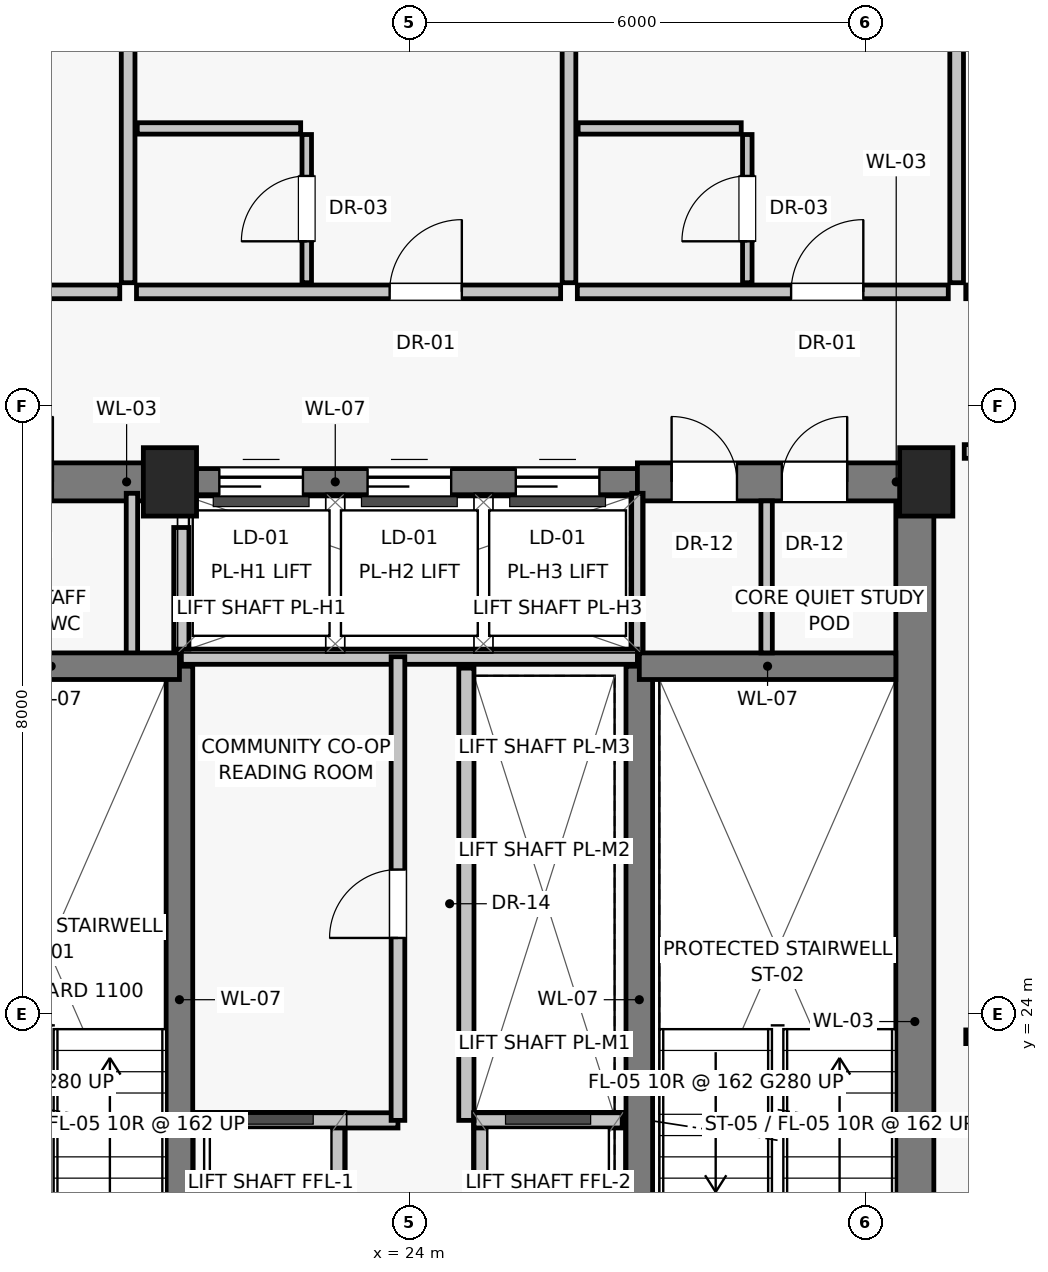
"""IFC4 building model, lengths in metres.
Left out: names, types, materials, properties, quantities, classifications, styles, units other than length and angle.
Written with IfcOpenShell. Run it as: python <this file> out.ifc"""

import sys

from ifc_helpers import new_model, si_unit, direction, frame, frame_2d, origin, origin_2d, place, context, subcontext, project, spatial, rectangle, extrude, source, transform, mapped, element, fill, save


model = new_model("IFC4")
c1 = context("Model", 3, precision=1e-05, world=origin(), true_north=direction((0.0, 1.0)))
c2 = subcontext(c1, "Body", "Model", "MODEL_VIEW")
j1 = project(units=[si_unit("LENGTHUNIT", "METRE"), si_unit("PLANEANGLEUNIT", "RADIAN")], contexts=[c1])
p1 = place(None, origin())
s1 = spatial("IfcSite", under=j1, at=p1, CompositionType="ELEMENT")
p2 = place(p1, origin())
s2 = spatial("IfcBuilding", under=s1, at=p2, CompositionType="ELEMENT")
p3 = place(p2, frame((0.0, 0.0, 182.1)))
s3 = spatial("IfcBuildingStorey", under=s2, at=p3, CompositionType="ELEMENT", Elevation=182.1)
for number, where, z_axis, x_axis in (
    (1, (20.85, 31.0, 0.0), (0.0, 0.0, 1.0), (1.0, 0.0, 0.0)),
    (2, (30.8, 31.0, 0.0), (0.0, 0.0, 1.0), (1.0, 0.0, 0.0)),
):
    element("IfcColumn", number, at=place(p3, frame(where, z_axis=z_axis, x_axis=x_axis)), inside=s3, PredefinedType="PILASTER", context=c2, shape_type="SweptSolid", body=[
        extrude(rectangle(XDim=0.7, YDim=0.9, at=origin_2d()), origin(), (0.0, 0.0, 1.0), 3.25),
    ])
p4 = place(p3, frame((30.65, 16.8, 0.0), z_axis=(0.0, 0.0, 1.0), x_axis=(0.0, 1.0, 0.0)))
e3 = element("IfcWall", 3, at=p4, inside=s3, PredefinedType="SHEAR", context=c2, shape_type="SweptSolid", body=[
    extrude(rectangle(XDim=14.2, YDim=0.5, at=frame_2d((7.1, 0.0))), origin(), (0.0, 0.0, 1.0), 3.015),
])
p5 = place(p3, frame((17.2, 31.0, 0.0), z_axis=(0.0, 0.0, 1.0), x_axis=(1.0, 0.0, 0.0)))
e4 = element("IfcWall", 4, at=p5, inside=s3, PredefinedType="SHEAR", context=c2, shape_type="SweptSolid", body=[
    extrude(rectangle(XDim=3.8, YDim=0.5, at=frame_2d((1.9, 0.0))), origin(), (0.0, 0.0, 1.0), 3.015),
])
p6 = place(p5, frame((1.25, 0.0, 0.0)))
e5 = element("IfcOpeningElement", 5, at=p6, cuts=e4, PredefinedType="OPENING", context=c2, shape_type="SweptSolid", body=[
    extrude(rectangle(XDim=0.86, YDim=2.01, at=frame_2d((0.43, 1.005))), frame((0.0, 0.26, 0.0), z_axis=(0.0, -1.0, 0.0), x_axis=(1.0, 0.0, 0.0)), (0.0, 0.0, 1.0), 0.52),
])
p7 = place(p3, frame((21.0, 31.0, 0.0), z_axis=(0.0, 0.0, 1.0), x_axis=(1.0, 0.0, 0.0)))
e6 = element("IfcWall", 6, at=p7, inside=s3, PredefinedType="SHEAR", context=c2, shape_type="SweptSolid", body=[
    extrude(rectangle(XDim=6.0, YDim=0.35, at=frame_2d((3.0, 0.0))), origin(), (0.0, 0.0, 1.0), 3.015),
])
p8 = place(p7, frame((0.5, 0.0, 0.0)))
e7 = element("IfcOpeningElement", 7, at=p8, cuts=e6, PredefinedType="OPENING", context=c2, shape_type="SweptSolid", body=[
    extrude(rectangle(XDim=1.1, YDim=2.08, at=frame_2d((0.55, 1.04))), frame((0.0, 0.185, 0.0), z_axis=(0.0, -1.0, 0.0), x_axis=(1.0, 0.0, 0.0)), (0.0, 0.0, 1.0), 0.37),
])
p9 = place(p7, frame((2.45, 0.0, 0.0)))
e8 = element("IfcOpeningElement", 8, at=p9, cuts=e6, PredefinedType="OPENING", context=c2, shape_type="SweptSolid", body=[
    extrude(rectangle(XDim=1.1, YDim=2.08, at=frame_2d((0.55, 1.04))), frame((0.0, 0.185, 0.0), z_axis=(0.0, -1.0, 0.0), x_axis=(1.0, 0.0, 0.0)), (0.0, 0.0, 1.0), 0.37),
])
p10 = place(p7, frame((4.4, 0.0, 0.0)))
e9 = element("IfcOpeningElement", 9, at=p10, cuts=e6, PredefinedType="OPENING", context=c2, shape_type="SweptSolid", body=[
    extrude(rectangle(XDim=1.1, YDim=2.08, at=frame_2d((0.55, 1.04))), frame((0.0, 0.185, 0.0), z_axis=(0.0, -1.0, 0.0), x_axis=(1.0, 0.0, 0.0)), (0.0, 0.0, 1.0), 0.37),
])
p11 = place(p3, frame((27.0, 31.0, 0.0), z_axis=(0.0, 0.0, 1.0), x_axis=(1.0, 0.0, 0.0)))
e10 = element("IfcWall", 10, at=p11, inside=s3, PredefinedType="SHEAR", context=c2, shape_type="SweptSolid", body=[
    extrude(rectangle(XDim=3.8, YDim=0.5, at=frame_2d((1.9, 0.0))), origin(), (0.0, 0.0, 1.0), 3.015),
])
p12 = place(p11, frame((0.45, 0.0, 0.0)))
e11 = element("IfcOpeningElement", 11, at=p12, cuts=e10, PredefinedType="OPENING", context=c2, shape_type="SweptSolid", body=[
    extrude(rectangle(XDim=0.86, YDim=2.01, at=frame_2d((0.43, 1.005))), frame((0.0, 0.26, 0.0), z_axis=(0.0, -1.0, 0.0), x_axis=(1.0, 0.0, 0.0)), (0.0, 0.0, 1.0), 0.52),
])
p13 = place(p11, frame((1.9, 0.0, 0.0)))
e12 = element("IfcOpeningElement", 12, at=p13, cuts=e10, PredefinedType="OPENING", context=c2, shape_type="SweptSolid", body=[
    extrude(rectangle(XDim=0.86, YDim=2.01, at=frame_2d((0.43, 1.005))), frame((0.0, 0.26, 0.0), z_axis=(0.0, -1.0, 0.0), x_axis=(1.0, 0.0, 0.0)), (0.0, 0.0, 1.0), 0.52),
])
for number, where, z_axis, x_axis in (
    (13, (20.35, 28.65, 0.0), (0.0, 0.0, 1.0), (0.0, 1.0, 0.0)),
    (14, (27.0, 28.65, 0.0), (0.0, 0.0, 1.0), (0.0, 1.0, 0.0)),
):
    element("IfcWall", number, at=place(p3, frame(where, z_axis=z_axis, x_axis=x_axis)), inside=s3, PredefinedType="PARTITIONING", context=c2, shape_type="SweptSolid", body=[
        extrude(rectangle(XDim=2.2, YDim=0.15, at=frame_2d((1.1, 0.0))), origin(), (0.0, 0.0, 1.0), 3.015),
    ])
for number, where, z_axis, x_axis in (
    (15, (20.975, 19.8, 0.0), (0.0, 0.0, 1.0), (0.0, 1.0, 0.0)),
    (16, (27.025, 19.8, 0.0), (0.0, 0.0, 1.0), (0.0, 1.0, 0.0)),
):
    element("IfcWall", number, at=place(p3, frame(where, z_axis=z_axis, x_axis=x_axis)), inside=s3, PredefinedType="SHEAR", context=c2, shape_type="SweptSolid", body=[
        extrude(rectangle(XDim=8.775, YDim=0.35, at=frame_2d((4.387, 0.0))), origin(), (0.0, 0.0, 1.0), 3.015),
    ])
for number, where, z_axis, x_axis in (
    (17, (17.6, 28.575, 0.0), (0.0, 0.0, 1.0), (1.0, 0.0, 0.0)),
    (18, (27.025, 28.575, 0.0), (0.0, 0.0, 1.0), (1.0, 0.0, 0.0)),
):
    element("IfcWall", number, at=place(p3, frame(where, z_axis=z_axis, x_axis=x_axis)), inside=s3, PredefinedType="SHEAR", context=c2, shape_type="SweptSolid", body=[
        extrude(rectangle(XDim=3.375, YDim=0.35, at=frame_2d((1.688, 0.0))), origin(), (0.0, 0.0, 1.0), 3.015),
    ])
for number, where, z_axis, x_axis in (
    (19, (23.05, 16.95, 0.0), (0.0, 0.0, 1.0), (0.0, 1.0, 0.0)),
    (20, (24.95, 16.95, 0.0), (0.0, 0.0, 1.0), (0.0, 1.0, 0.0)),
):
    element("IfcWall", number, at=place(p3, frame(where, z_axis=z_axis, x_axis=x_axis)), inside=s3, PredefinedType="SOLIDWALL", context=c2, shape_type="SweptSolid", body=[
        extrude(rectangle(XDim=5.6, YDim=0.2, at=frame_2d((2.8, 0.0))), origin(), (0.0, 0.0, 1.0), 3.015),
    ])
p14 = place(p3, frame((21.2, 22.6, 0.0), z_axis=(0.0, 0.0, 1.0), x_axis=(1.0, 0.0, 0.0)))
e21 = element("IfcWall", 21, at=p14, inside=s3, PredefinedType="SOLIDWALL", context=c2, shape_type="SweptSolid", body=[
    extrude(rectangle(XDim=2.65, YDim=0.2, at=frame_2d((1.325, 0.0))), origin(), (0.0, 0.0, 1.0), 3.015),
])
p15 = place(p3, frame((24.85, 22.6, 0.0), z_axis=(0.0, 0.0, 1.0), x_axis=(1.0, 0.0, 0.0)))
e22 = element("IfcWall", 22, at=p15, inside=s3, PredefinedType="SOLIDWALL", context=c2, shape_type="SweptSolid", body=[
    extrude(rectangle(XDim=1.95, YDim=0.2, at=frame_2d((0.975, 0.0))), origin(), (0.0, 0.0, 1.0), 3.015),
])
p16 = place(p3, frame((21.0, 28.7, 0.0), z_axis=(0.0, 0.0, 1.0), x_axis=(1.0, 0.0, 0.0)))
e23 = element("IfcWall", 23, at=p16, inside=s3, PredefinedType="SOLIDWALL", context=c2, shape_type="SweptSolid", body=[
    extrude(rectangle(XDim=6.0, YDim=0.2, at=frame_2d((3.0, 0.0))), origin(), (0.0, 0.0, 1.0), 3.015),
])
p17 = place(p3, frame((21.0, 28.8, 0.0), z_axis=(0.0, 0.0, 1.0), x_axis=(0.0, 1.0, 0.0)))
e24 = element("IfcWall", 24, at=p17, inside=s3, PredefinedType="SOLIDWALL", context=c2, shape_type="SweptSolid", body=[
    extrude(rectangle(XDim=1.6, YDim=0.2, at=frame_2d((0.8, 0.0))), origin(), (0.0, 0.0, 1.0), 3.015),
])
p18 = place(p3, frame((23.85, 22.6, 0.0), z_axis=(0.0, 0.0, 1.0), x_axis=(0.0, 1.0, 0.0)))
e25 = element("IfcWall", 25, at=p18, inside=s3, PredefinedType="PARTITIONING", context=c2, shape_type="SweptSolid", body=[
    extrude(rectangle(XDim=6.1, YDim=0.18, at=frame_2d((3.05, 0.0))), origin(), (0.0, 0.0, 1.0), 3.015),
])
p19 = place(p18, frame((2.4, 0.0, 0.0)))
e26 = element("IfcOpeningElement", 26, at=p19, cuts=e25, PredefinedType="OPENING", context=c2, shape_type="SweptSolid", body=[
    extrude(rectangle(XDim=0.9, YDim=2.01, at=frame_2d((0.45, 1.005))), frame((0.0, 0.1, 0.0), z_axis=(0.0, -1.0, 0.0), x_axis=(1.0, 0.0, 0.0)), (0.0, 0.0, 1.0), 0.2),
])
p20 = place(p3, frame((24.75, 22.6, 0.0), z_axis=(0.0, 0.0, 1.0), x_axis=(0.0, 1.0, 0.0)))
e27 = element("IfcWall", 27, at=p20, inside=s3, PredefinedType="SOLIDWALL", context=c2, shape_type="SweptSolid", body=[
    extrude(rectangle(XDim=5.95, YDim=0.2, at=frame_2d((2.975, 0.0))), origin(), (0.0, 0.0, 1.0), 3.015),
])
p21 = place(p3, frame((28.7, 28.75, 0.0), z_axis=(0.0, 0.0, 1.0), x_axis=(0.0, 1.0, 0.0)))
e28 = element("IfcWall", 28, at=p21, inside=s3, PredefinedType="PARTITIONING", context=c2, shape_type="SweptSolid", body=[
    extrude(rectangle(XDim=2.0, YDim=0.15, at=frame_2d((1.0, 0.0))), origin(), (0.0, 0.0, 1.0), 3.015),
])
p22 = place(p3, frame((31.2, 33.62, 0.0), z_axis=(0.0, 0.0, 1.0), x_axis=(0.0, 1.0, 0.0)))
e29 = element("IfcWall", 29, at=p22, inside=s3, PredefinedType="PARTITIONING", context=c2, shape_type="SweptSolid", body=[
    extrude(rectangle(XDim=6.597, YDim=0.18, at=frame_2d((3.299, 0.0))), origin(), (0.0, 0.0, 1.0), 3.015),
])
p23 = place(p3, frame((15.31, 33.5, 0.0), z_axis=(0.0, 0.0, 1.0), x_axis=(1.0, 0.0, 0.0)))
e30 = element("IfcWall", 30, at=p23, inside=s3, PredefinedType="PARTITIONING", context=c2, shape_type="SweptSolid", body=[
    extrude(rectangle(XDim=4.88, YDim=0.18, at=frame_2d((2.44, 0.0))), origin(), (0.0, 0.0, 1.0), 3.015),
])
p24 = place(p23, frame((2.812, 0.0, 0.0)))
e31 = element("IfcOpeningElement", 31, at=p24, cuts=e30, PredefinedType="OPENING", context=c2, shape_type="SweptSolid", body=[
    extrude(rectangle(XDim=0.95, YDim=2.02, at=frame_2d((0.475, 1.01))), frame((0.0, 0.1, 0.0), z_axis=(0.0, -1.0, 0.0), x_axis=(1.0, 0.0, 0.0)), (0.0, 0.0, 1.0), 0.2),
])
p25 = place(p3, frame((20.3, 33.62, 0.0), z_axis=(0.0, 0.0, 1.0), x_axis=(0.0, 1.0, 0.0)))
e32 = element("IfcWall", 32, at=p25, inside=s3, PredefinedType="PARTITIONING", context=c2, shape_type="SweptSolid", body=[
    extrude(rectangle(XDim=9.439, YDim=0.18, at=frame_2d((4.719, 0.0))), origin(), (0.0, 0.0, 1.0), 2.469),
])
p26 = place(p3, frame((20.41, 33.5, 0.0), z_axis=(0.0, 0.0, 1.0), x_axis=(1.0, 0.0, 0.0)))
e33 = element("IfcWall", 33, at=p26, inside=s3, PredefinedType="PARTITIONING", context=c2, shape_type="SweptSolid", body=[
    extrude(rectangle(XDim=5.58, YDim=0.18, at=frame_2d((2.79, 0.0))), origin(), (0.0, 0.0, 1.0), 3.015),
])
p27 = place(p26, frame((3.33, 0.0, 0.0)))
e34 = element("IfcOpeningElement", 34, at=p27, cuts=e33, PredefinedType="OPENING", context=c2, shape_type="SweptSolid", body=[
    extrude(rectangle(XDim=0.95, YDim=2.02, at=frame_2d((0.475, 1.01))), frame((0.0, 0.1, 0.0), z_axis=(0.0, -1.0, 0.0), x_axis=(1.0, 0.0, 0.0)), (0.0, 0.0, 1.0), 0.2),
])
p28 = place(p3, frame((22.65, 33.62, 0.0), z_axis=(0.0, 0.0, 1.0), x_axis=(0.0, 1.0, 0.0)))
e35 = element("IfcWall", 35, at=p28, inside=s3, PredefinedType="PARTITIONING", context=c2, shape_type="SweptSolid", body=[
    extrude(rectangle(XDim=1.95, YDim=0.125, at=frame_2d((0.975, 0.0))), origin(), (0.0, 0.0, 1.0), 3.015),
])
p29 = place(p28, frame((0.545, 0.0, 0.0)))
e36 = element("IfcOpeningElement", 36, at=p29, cuts=e35, PredefinedType="OPENING", context=c2, shape_type="SweptSolid", body=[
    extrude(rectangle(XDim=0.86, YDim=2.01, at=frame_2d((0.43, 1.005))), frame((0.0, 0.073, 0.0), z_axis=(0.0, -1.0, 0.0), x_axis=(1.0, 0.0, 0.0)), (0.0, 0.0, 1.0), 0.145),
])
p30 = place(p3, frame((20.42, 35.65, 0.0), z_axis=(0.0, 0.0, 1.0), x_axis=(1.0, 0.0, 0.0)))
e37 = element("IfcWall", 37, at=p30, inside=s3, PredefinedType="PARTITIONING", context=c2, shape_type="SweptSolid", body=[
    extrude(rectangle(XDim=2.15, YDim=0.15, at=frame_2d((1.075, 0.0))), origin(), (0.0, 0.0, 1.0), 2.662),
])
p31 = place(p3, frame((26.1, 33.62, 0.0), z_axis=(0.0, 0.0, 1.0), x_axis=(0.0, 1.0, 0.0)))
e38 = element("IfcWall", 38, at=p31, inside=s3, PredefinedType="PARTITIONING", context=c2, shape_type="SweptSolid", body=[
    extrude(rectangle(XDim=8.737, YDim=0.18, at=frame_2d((4.369, 0.0))), origin(), (0.0, 0.0, 1.0), 3.015),
])
p32 = place(p3, frame((26.21, 33.5, 0.0), z_axis=(0.0, 0.0, 1.0), x_axis=(1.0, 0.0, 0.0)))
e39 = element("IfcWall", 39, at=p32, inside=s3, PredefinedType="PARTITIONING", context=c2, shape_type="SweptSolid", body=[
    extrude(rectangle(XDim=4.88, YDim=0.18, at=frame_2d((2.44, 0.0))), origin(), (0.0, 0.0, 1.0), 3.015),
])
p33 = place(p32, frame((2.812, 0.0, 0.0)))
e40 = element("IfcOpeningElement", 40, at=p33, cuts=e39, PredefinedType="OPENING", context=c2, shape_type="SweptSolid", body=[
    extrude(rectangle(XDim=0.95, YDim=2.02, at=frame_2d((0.475, 1.01))), frame((0.0, 0.1, 0.0), z_axis=(0.0, -1.0, 0.0), x_axis=(1.0, 0.0, 0.0)), (0.0, 0.0, 1.0), 0.2),
])
p34 = place(p3, frame((28.446, 33.62, 0.0), z_axis=(0.0, 0.0, 1.0), x_axis=(0.0, 1.0, 0.0)))
e41 = element("IfcWall", 41, at=p34, inside=s3, PredefinedType="PARTITIONING", context=c2, shape_type="SweptSolid", body=[
    extrude(rectangle(XDim=1.95, YDim=0.125, at=frame_2d((0.975, 0.0))), origin(), (0.0, 0.0, 1.0), 3.015),
])
p35 = place(p34, frame((0.545, 0.0, 0.0)))
e42 = element("IfcOpeningElement", 42, at=p35, cuts=e41, PredefinedType="OPENING", context=c2, shape_type="SweptSolid", body=[
    extrude(rectangle(XDim=0.86, YDim=2.01, at=frame_2d((0.43, 1.005))), frame((0.0, 0.073, 0.0), z_axis=(0.0, -1.0, 0.0), x_axis=(1.0, 0.0, 0.0)), (0.0, 0.0, 1.0), 0.145),
])
p36 = place(p3, frame((26.22, 35.65, 0.0), z_axis=(0.0, 0.0, 1.0), x_axis=(1.0, 0.0, 0.0)))
e43 = element("IfcWall", 43, at=p36, inside=s3, PredefinedType="PARTITIONING", context=c2, shape_type="SweptSolid", body=[
    extrude(rectangle(XDim=2.146, YDim=0.15, at=frame_2d((1.073, 0.0))), origin(), (0.0, 0.0, 1.0), 2.662),
])
p37 = place(p3, frame((31.32, 23.7, 0.0), z_axis=(0.0, 0.0, 1.0), x_axis=(1.0, 0.0, 0.0)))
e44 = element("IfcWall", 44, at=p37, inside=s3, PredefinedType="PARTITIONING", context=c2, shape_type="SweptSolid", body=[
    extrude(rectangle(XDim=10.601, YDim=0.18, at=frame_2d((5.3, 0.0))), origin(), (0.0, 0.0, 1.0), 3.015),
])
p38 = place(p3, frame((31.3, 31.4, 0.0), z_axis=(0.0, 0.0, 1.0), x_axis=(1.0, 0.0, 0.0)))
e45 = element("IfcWall", 45, at=p38, inside=s3, PredefinedType="PARTITIONING", context=c2, shape_type="SweptSolid", body=[
    extrude(rectangle(XDim=1.92, YDim=0.18, at=frame_2d((0.96, 0.0))), origin(), (0.0, 0.0, 1.0), 3.015),
])
p39 = place(p38, frame((0.72, 0.0, 0.0)))
e46 = element("IfcOpeningElement", 46, at=p39, cuts=e45, PredefinedType="OPENING", context=c2, shape_type="SweptSolid", body=[
    extrude(rectangle(XDim=1.0, YDim=2.01, at=frame_2d((0.5, 1.005))), frame((0.0, 0.1, 0.0), z_axis=(0.0, -1.0, 0.0), x_axis=(1.0, 0.0, 0.0)), (0.0, 0.0, 1.0), 0.2),
])
p40 = place(p3, frame((31.32, 33.5, 0.0), z_axis=(0.0, 0.0, 1.0), x_axis=(1.0, 0.0, 0.0)))
e47 = element("IfcWall", 47, at=p40, inside=s3, PredefinedType="PARTITIONING", context=c2, shape_type="SweptSolid", body=[
    extrude(rectangle(XDim=1.86, YDim=0.18, at=frame_2d((0.93, 0.0))), origin(), (0.0, 0.0, 1.0), 3.015),
])
p41 = place(p40, frame((0.48, 0.0, 0.0)))
e48 = element("IfcOpeningElement", 48, at=p41, cuts=e47, PredefinedType="OPENING", context=c2, shape_type="SweptSolid", body=[
    extrude(rectangle(XDim=0.9, YDim=2.01, at=frame_2d((0.45, 1.005))), frame((0.0, 0.1, 0.0), z_axis=(0.0, -1.0, 0.0), x_axis=(1.0, 0.0, 0.0)), (0.0, 0.0, 1.0), 0.2),
])
m1 = source(origin(), c2, "Body", "SweptSolid", [
    extrude(rectangle(XDim=0.86, YDim=2.01, at=frame_2d((0.43, 1.005))), frame((0.0, 0.025, 0.0), z_axis=(0.0, -1.0, 0.0), x_axis=(1.0, 0.0, 0.0)), (0.0, 0.0, 1.0), 0.05),
])
p42 = place(p6, origin())
e49 = element("IfcDoor", 49, at=p42, inside=s3, OperationType="SINGLE_SWING_RIGHT", PredefinedType="DOOR", context=c2, shape_type="MappedRepresentation", body=[
    mapped(m1, transform((0.0, 0.0, 0.0), scale=1.0)),
])
fill(e5, e49)
m2 = source(origin(), c2, "Body", "SweptSolid", [
    extrude(rectangle(XDim=1.1, YDim=2.08, at=frame_2d((0.55, 1.04))), frame((0.0, 0.025, 0.0), z_axis=(0.0, -1.0, 0.0), x_axis=(1.0, 0.0, 0.0)), (0.0, 0.0, 1.0), 0.05),
])
p43 = place(p8, origin())
e50 = element("IfcDoor", 50, at=p43, inside=s3, OperationType="SLIDING_TO_LEFT", PredefinedType="DOOR", context=c2, shape_type="MappedRepresentation", body=[
    mapped(m2, transform((0.0, 0.0, 0.0), scale=1.0)),
])
fill(e7, e50)
p44 = place(p9, origin())
e51 = element("IfcDoor", 51, at=p44, inside=s3, OperationType="SLIDING_TO_LEFT", PredefinedType="DOOR", context=c2, shape_type="MappedRepresentation", body=[
    mapped(m2, transform((0.0, 0.0, 0.0), scale=1.0)),
])
fill(e8, e51)
p45 = place(p10, origin())
e52 = element("IfcDoor", 52, at=p45, inside=s3, OperationType="SLIDING_TO_LEFT", PredefinedType="DOOR", context=c2, shape_type="MappedRepresentation", body=[
    mapped(m2, transform((0.0, 0.0, 0.0), scale=1.0)),
])
fill(e9, e52)
p46 = place(p12, origin())
e53 = element("IfcDoor", 53, at=p46, inside=s3, OperationType="SINGLE_SWING_LEFT", PredefinedType="DOOR", context=c2, shape_type="MappedRepresentation", body=[
    mapped(m1, transform((0.0, 0.0, 0.0), scale=1.0)),
])
fill(e11, e53)
p47 = place(p13, origin())
e54 = element("IfcDoor", 54, at=p47, inside=s3, OperationType="SINGLE_SWING_RIGHT", PredefinedType="DOOR", context=c2, shape_type="MappedRepresentation", body=[
    mapped(m1, transform((0.0, 0.0, 0.0), scale=1.0)),
])
fill(e12, e54)
m3 = source(origin(), c2, "Body", "SweptSolid", [
    extrude(rectangle(XDim=0.9, YDim=2.01, at=frame_2d((0.45, 1.005))), frame((0.0, 0.025, 0.0), z_axis=(0.0, -1.0, 0.0), x_axis=(1.0, 0.0, 0.0)), (0.0, 0.0, 1.0), 0.05),
])
p48 = place(p19, origin())
e55 = element("IfcDoor", 55, at=p48, inside=s3, OperationType="SINGLE_SWING_LEFT", PredefinedType="DOOR", context=c2, shape_type="MappedRepresentation", body=[
    mapped(m3, transform((0.0, 0.0, 0.0), scale=1.0)),
])
fill(e26, e55)
m4 = source(origin(), c2, "Body", "SweptSolid", [
    extrude(rectangle(XDim=0.95, YDim=2.02, at=frame_2d((0.475, 1.01))), frame((0.0, 0.025, 0.0), z_axis=(0.0, -1.0, 0.0), x_axis=(1.0, 0.0, 0.0)), (0.0, 0.0, 1.0), 0.05),
])
p49 = place(p27, origin())
e56 = element("IfcDoor", 56, at=p49, inside=s3, OperationType="SINGLE_SWING_RIGHT", PredefinedType="DOOR", context=c2, shape_type="MappedRepresentation", body=[
    mapped(m4, transform((0.0, 0.0, 0.0), scale=1.0)),
])
fill(e34, e56)
p50 = place(p29, origin())
e57 = element("IfcDoor", 57, at=p50, inside=s3, OperationType="SINGLE_SWING_LEFT", PredefinedType="DOOR", context=c2, shape_type="MappedRepresentation", body=[
    mapped(m1, transform((0.0, 0.0, 0.0), scale=1.0)),
])
fill(e36, e57)
p51 = place(p33, origin())
e58 = element("IfcDoor", 58, at=p51, inside=s3, OperationType="SINGLE_SWING_RIGHT", PredefinedType="DOOR", context=c2, shape_type="MappedRepresentation", body=[
    mapped(m4, transform((0.0, 0.0, 0.0), scale=1.0)),
])
fill(e40, e58)
p52 = place(p35, origin())
e59 = element("IfcDoor", 59, at=p52, inside=s3, OperationType="SINGLE_SWING_LEFT", PredefinedType="DOOR", context=c2, shape_type="MappedRepresentation", body=[
    mapped(m1, transform((0.0, 0.0, 0.0), scale=1.0)),
])
fill(e42, e59)
save(model, sys.argv[1])
